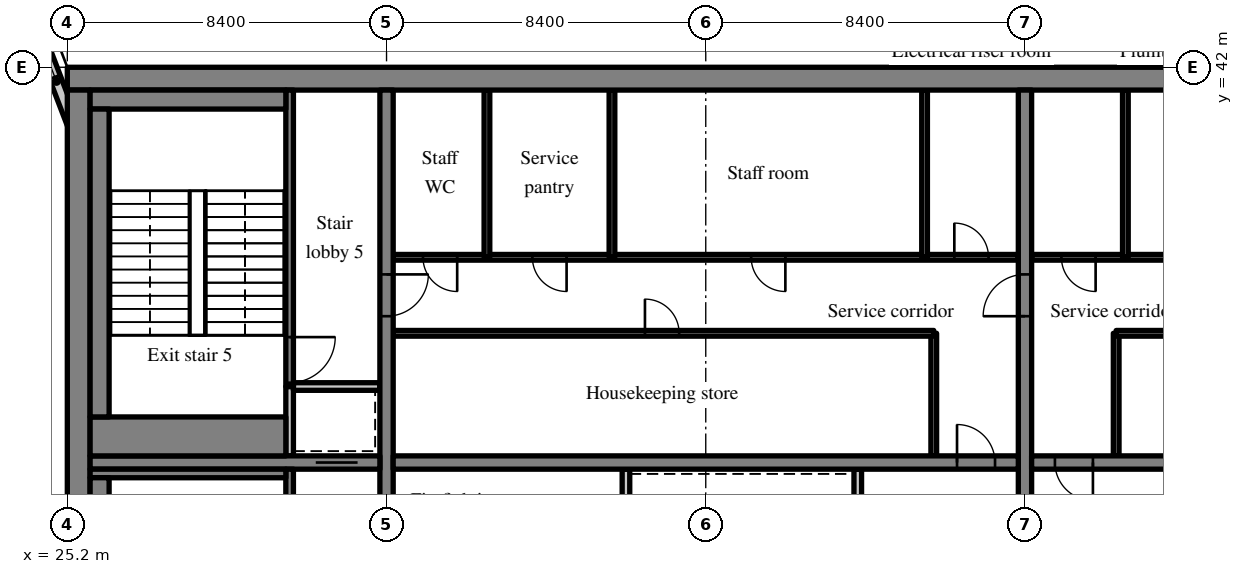
"""IFC4 building model, lengths in metres.
Left out: names, types, materials, properties, quantities, classifications, styles, units other than length and angle.
Written with IfcOpenShell. Run it as: python <this file> out.ifc"""

import sys

from ifc_helpers import new_model, si_unit, direction, frame, frame_2d, origin, place, context, subcontext, project, spatial, rectangle, extrude, source, transform, mapped, element, fill, save


model = new_model("IFC4")
c1 = context("Model", 3, precision=1e-05, world=origin(), true_north=direction((0.0, 1.0)))
c2 = subcontext(c1, "Body", "Model", "MODEL_VIEW")
j1 = project(units=[si_unit("LENGTHUNIT", "METRE"), si_unit("PLANEANGLEUNIT", "RADIAN")], contexts=[c1])
p1 = place(None, origin())
s1 = spatial("IfcSite", under=j1, at=p1, CompositionType="ELEMENT")
p2 = place(p1, origin())
s2 = spatial("IfcBuilding", under=s1, at=p2, CompositionType="ELEMENT")
p3 = place(p2, frame((0.0, 0.0, 253.0)))
s3 = spatial("IfcBuildingStorey", under=s2, at=p3, CompositionType="ELEMENT", Elevation=253.0)
m1 = source(origin(), c2, "Body", "SweptSolid", [
    extrude(rectangle(XDim=50.4, YDim=0.6, at=frame_2d((25.2, 0.0))), origin(), (0.0, 0.0, 1.0), 3.62),
])
p4 = place(p3, frame((25.2, 41.7, 0.0), z_axis=(0.0, 0.0, 1.0), x_axis=(1.0, 0.0, 0.0)))
e1 = element("IfcWall", 1, at=p4, inside=s3, PredefinedType="SHEAR", context=c2, shape_type="MappedRepresentation", body=[
    mapped(m1, transform((0.0, 0.0, 0.0), scale=1.0)),
])
m2 = source(origin(), c2, "Body", "SweptSolid", [
    extrude(rectangle(XDim=18.8, YDim=0.6, at=frame_2d((9.4, 0.0))), origin(), (0.0, 0.0, 1.0), 3.62),
])
p5 = place(p3, frame((25.5, 22.6, 0.0), z_axis=(0.0, 0.0, 1.0), x_axis=(0.0, 1.0, 0.0)))
e2 = element("IfcWall", 2, at=p5, inside=s3, PredefinedType="SHEAR", context=c2, shape_type="MappedRepresentation", body=[
    mapped(m2, transform((0.0, 0.0, 0.0), scale=1.0)),
])
m3 = source(origin(), c2, "Body", "SweptSolid", [
    extrude(rectangle(XDim=18.8, YDim=0.35, at=frame_2d((9.4, 0.0))), origin(), (0.0, 0.0, 1.0), 3.62),
])
p6 = place(p3, frame((33.6, 22.6, 0.0), z_axis=(0.0, 0.0, 1.0), x_axis=(0.0, 1.0, 0.0)))
e3 = element("IfcWall", 3, at=p6, inside=s3, PredefinedType="SHEAR", context=c2, shape_type="MappedRepresentation", body=[
    mapped(m3, transform((0.0, 0.0, 0.0), scale=1.0)),
])
m4 = source(origin(), c2, "Body", "SweptSolid", [
    extrude(rectangle(XDim=1.1, YDim=2.1, at=frame_2d((0.55, 1.05))), frame((0.0, 0.185, 0.0), z_axis=(0.0, -1.0, 0.0), x_axis=(1.0, 0.0, 0.0)), (0.0, 0.0, 1.0), 0.37),
])
p7 = place(p6, frame((12.85, 0.0, 0.0)))
e4 = element("IfcOpeningElement", 4, at=p7, cuts=e3, PredefinedType="OPENING", context=c2, shape_type="MappedRepresentation", body=[
    mapped(m4, transform((0.0, 0.0, 0.0), scale=1.0)),
])
p8 = place(p3, frame((50.4, 22.6, 0.0), z_axis=(0.0, 0.0, 1.0), x_axis=(0.0, 1.0, 0.0)))
e5 = element("IfcWall", 5, at=p8, inside=s3, PredefinedType="SHEAR", context=c2, shape_type="MappedRepresentation", body=[
    mapped(m3, transform((0.0, 0.0, 0.0), scale=1.0)),
])
p9 = place(p8, frame((12.85, 0.0, 0.0)))
e6 = element("IfcOpeningElement", 6, at=p9, cuts=e5, PredefinedType="OPENING", context=c2, shape_type="MappedRepresentation", body=[
    mapped(m4, transform((0.0, 0.0, 0.0), scale=1.0)),
])
m5 = source(origin(), c2, "Body", "SweptSolid", [
    extrude(rectangle(XDim=7.625, YDim=0.35, at=frame_2d((3.812, 0.0))), origin(), (0.0, 0.0, 1.0), 3.62),
])
p10 = place(p3, frame((25.8, 31.6, 0.0), z_axis=(0.0, 0.0, 1.0), x_axis=(1.0, 0.0, 0.0)))
e7 = element("IfcWall", 7, at=p10, inside=s3, PredefinedType="SHEAR", context=c2, shape_type="MappedRepresentation", body=[
    mapped(m5, transform((0.0, 0.0, 0.0), scale=1.0)),
])
p11 = place(p10, frame((5.938, 0.0, 0.0)))
e8 = element("IfcOpeningElement", 8, at=p11, cuts=e7, PredefinedType="OPENING", context=c2, shape_type="MappedRepresentation", body=[
    mapped(m4, transform((0.0, 0.0, 0.0), scale=1.0)),
])
m6 = source(origin(), c2, "Body", "SweptSolid", [
    extrude(rectangle(XDim=16.45, YDim=0.35, at=frame_2d((8.225, 0.0))), origin(), (0.0, 0.0, 1.0), 3.62),
])
p12 = place(p3, frame((33.775, 31.6, 0.0), z_axis=(0.0, 0.0, 1.0), x_axis=(1.0, 0.0, 0.0)))
e9 = element("IfcWall", 9, at=p12, inside=s3, PredefinedType="SHEAR", context=c2, shape_type="MappedRepresentation", body=[
    mapped(m6, transform((0.0, 0.0, 0.0), scale=1.0)),
])
m7 = source(origin(), c2, "Body", "SweptSolid", [
    extrude(rectangle(XDim=1.0, YDim=2.1, at=frame_2d((0.5, 1.05))), frame((0.0, 0.185, 0.0), z_axis=(0.0, -1.0, 0.0), x_axis=(1.0, 0.0, 0.0)), (0.0, 0.0, 1.0), 0.37),
])
p13 = place(p12, frame((14.837, 0.0, 0.0)))
e10 = element("IfcOpeningElement", 10, at=p13, cuts=e9, PredefinedType="OPENING", context=c2, shape_type="MappedRepresentation", body=[
    mapped(m7, transform((0.0, 0.0, 0.0), scale=1.0)),
])
m8 = source(origin(), c2, "Body", "SweptSolid", [
    extrude(rectangle(XDim=16.45, YDim=0.35, at=frame_2d((8.225, 0.0))), origin(), (0.0, 0.0, 1.0), 3.62),
])
p14 = place(p3, frame((50.575, 31.6, 0.0), z_axis=(0.0, 0.0, 1.0), x_axis=(1.0, 0.0, 0.0)))
e11 = element("IfcWall", 11, at=p14, inside=s3, PredefinedType="SHEAR", context=c2, shape_type="MappedRepresentation", body=[
    mapped(m8, transform((0.0, 0.0, 0.0), scale=1.0)),
])
p15 = place(p14, frame((0.613, 0.0, 0.0)))
e12 = element("IfcOpeningElement", 12, at=p15, cuts=e11, PredefinedType="OPENING", context=c2, shape_type="MappedRepresentation", body=[
    mapped(m7, transform((0.0, 0.0, 0.0), scale=1.0)),
])
m9 = source(origin(), c2, "Body", "SweptSolid", [
    extrude(rectangle(XDim=3.559, YDim=0.3, at=frame_2d((1.78, 0.0))), origin(), (0.0, 0.0, 1.0), 3.62),
])
p16 = place(p3, frame((25.55, 39.969, 0.0), z_axis=(0.0, 0.0, 1.0), x_axis=(-0.35779745313, 0.933799219604, 0.0)))
e13 = element("IfcWall", 13, at=p16, inside=s3, PredefinedType="SOLIDWALL", context=c2, shape_type="MappedRepresentation", body=[
    mapped(m9, transform((0.0, 0.0, 0.0), scale=1.0)),
])
m10 = source(origin(), c2, "Body", "SweptSolid", [
    extrude(rectangle(XDim=1.5, YDim=2.0, at=frame_2d((0.75, 1.0))), frame((0.0, 0.16, 0.0), z_axis=(0.0, -1.0, 0.0), x_axis=(1.0, 0.0, 0.0)), (0.0, 0.0, 1.0), 0.32),
])
p17 = place(p16, frame((1.903, 0.0, 0.9)))
e14 = element("IfcOpeningElement", 14, at=p17, cuts=e13, PredefinedType="OPENING", context=c2, shape_type="MappedRepresentation", body=[
    mapped(m10, transform((0.0, 0.0, 0.0), scale=1.0)),
])
m11 = source(origin(), c2, "Body", "SweptSolid", [
    extrude(rectangle(XDim=8.825, YDim=0.2, at=frame_2d((4.413, 0.0))), origin(), (0.0, 0.0, 1.0), 3.62),
])
p18 = place(p3, frame((39.9, 22.6, 0.0), z_axis=(0.0, 0.0, 1.0), x_axis=(0.0, 1.0, 0.0)))
e15 = element("IfcWall", 15, at=p18, inside=s3, PredefinedType="PARTITIONING", context=c2, shape_type="MappedRepresentation", body=[
    mapped(m11, transform((0.0, 0.0, 0.0), scale=1.0)),
])
m12 = source(origin(), c2, "Body", "SweptSolid", [
    extrude(rectangle(XDim=0.9, YDim=2.1, at=frame_2d((0.45, 1.05))), frame((0.0, 0.11, 0.0), z_axis=(0.0, -1.0, 0.0), x_axis=(1.0, 0.0, 0.0)), (0.0, 0.0, 1.0), 0.22),
])
p19 = place(p18, frame((3.95, 0.0, 0.0)))
e16 = element("IfcOpeningElement", 16, at=p19, cuts=e15, PredefinedType="OPENING", context=c2, shape_type="MappedRepresentation", body=[
    mapped(m12, transform((0.0, 0.0, 0.0), scale=1.0)),
])
m13 = source(origin(), c2, "Body", "SweptSolid", [
    extrude(rectangle(XDim=2.625, YDim=0.2, at=frame_2d((1.312, 0.0))), origin(), (0.0, 0.0, 1.0), 3.62),
])
p20 = place(p3, frame((46.0, 28.8, 0.0), z_axis=(0.0, 0.0, 1.0), x_axis=(0.0, 1.0, 0.0)))
e17 = element("IfcWall", 17, at=p20, inside=s3, PredefinedType="SOLIDWALL", context=c2, shape_type="MappedRepresentation", body=[
    mapped(m13, transform((0.0, 0.0, 0.0), scale=1.0)),
])
m14 = source(origin(), c2, "Body", "SweptSolid", [
    extrude(rectangle(XDim=3.225, YDim=0.15, at=frame_2d((1.613, 0.0))), origin(), (0.0, 0.0, 1.0), 3.62),
])
p21 = place(p3, frame((48.0, 31.775, 0.0), z_axis=(0.0, 0.0, 1.0), x_axis=(0.0, 1.0, 0.0)))
e18 = element("IfcWall", 18, at=p21, inside=s3, PredefinedType="PARTITIONING", context=c2, shape_type="MappedRepresentation", body=[
    mapped(m14, transform((0.0, 0.0, 0.0), scale=1.0)),
])
m15 = source(origin(), c2, "Body", "SweptSolid", [
    extrude(rectangle(XDim=14.225, YDim=0.15, at=frame_2d((7.113, 0.0))), origin(), (0.0, 0.0, 1.0), 3.62),
])
p22 = place(p3, frame((33.775, 35.0, 0.0), z_axis=(0.0, 0.0, 1.0), x_axis=(1.0, 0.0, 0.0)))
e19 = element("IfcWall", 19, at=p22, inside=s3, PredefinedType="PARTITIONING", context=c2, shape_type="MappedRepresentation", body=[
    mapped(m15, transform((0.0, 0.0, 0.0), scale=1.0)),
])
m16 = source(origin(), c2, "Body", "SweptSolid", [
    extrude(rectangle(XDim=0.9, YDim=2.1, at=frame_2d((0.45, 1.05))), frame((0.0, 0.085, 0.0), z_axis=(0.0, -1.0, 0.0), x_axis=(1.0, 0.0, 0.0)), (0.0, 0.0, 1.0), 0.17),
])
p23 = place(p22, frame((6.625, 0.0, 0.0)))
e20 = element("IfcOpeningElement", 20, at=p23, cuts=e19, PredefinedType="OPENING", context=c2, shape_type="MappedRepresentation", body=[
    mapped(m16, transform((0.0, 0.0, 0.0), scale=1.0)),
])
m17 = source(origin(), c2, "Body", "SweptSolid", [
    extrude(rectangle(XDim=16.45, YDim=0.15, at=frame_2d((8.225, 0.0))), origin(), (0.0, 0.0, 1.0), 3.62),
])
p24 = place(p3, frame((33.775, 37.0, 0.0), z_axis=(0.0, 0.0, 1.0), x_axis=(1.0, 0.0, 0.0)))
e21 = element("IfcWall", 21, at=p24, inside=s3, PredefinedType="PARTITIONING", context=c2, shape_type="MappedRepresentation", body=[
    mapped(m17, transform((0.0, 0.0, 0.0), scale=1.0)),
])
p25 = place(p24, frame((0.784, 0.0, 0.0)))
e22 = element("IfcOpeningElement", 22, at=p25, cuts=e21, PredefinedType="OPENING", context=c2, shape_type="MappedRepresentation", body=[
    mapped(m16, transform((0.0, 0.0, 0.0), scale=1.0)),
])
p26 = place(p24, frame((3.663, 0.0, 0.0)))
e23 = element("IfcOpeningElement", 23, at=p26, cuts=e21, PredefinedType="OPENING", context=c2, shape_type="MappedRepresentation", body=[
    mapped(m16, transform((0.0, 0.0, 0.0), scale=1.0)),
])
p27 = place(p24, frame((9.42, 0.0, 0.0)))
e24 = element("IfcOpeningElement", 24, at=p27, cuts=e21, PredefinedType="OPENING", context=c2, shape_type="MappedRepresentation", body=[
    mapped(m16, transform((0.0, 0.0, 0.0), scale=1.0)),
])
p28 = place(p24, frame((14.766, 0.0, 0.0)))
e25 = element("IfcOpeningElement", 25, at=p28, cuts=e21, PredefinedType="OPENING", context=c2, shape_type="MappedRepresentation", body=[
    mapped(m16, transform((0.0, 0.0, 0.0), scale=1.0)),
])
m18 = source(origin(), c2, "Body", "SweptSolid", [
    extrude(rectangle(XDim=4.4, YDim=0.15, at=frame_2d((2.2, 0.0))), origin(), (0.0, 0.0, 1.0), 3.62),
])
for number, where, z_axis, x_axis in (
    (26, (36.242, 37.0, 0.0), (0.0, 0.0, 1.0), (0.0, 1.0, 0.0)),
    (27, (39.532, 37.0, 0.0), (0.0, 0.0, 1.0), (0.0, 1.0, 0.0)),
    (28, (47.758, 37.0, 0.0), (0.0, 0.0, 1.0), (0.0, 1.0, 0.0)),
):
    element("IfcWall", number, at=place(p3, frame(where, z_axis=z_axis, x_axis=x_axis)), inside=s3, PredefinedType="PARTITIONING", context=c2, shape_type="MappedRepresentation", body=[
        mapped(m18, transform((0.0, 0.0, 0.0), scale=1.0)),
    ])
p29 = place(p3, frame((52.8, 31.775, 0.0), z_axis=(0.0, 0.0, 1.0), x_axis=(0.0, 1.0, 0.0)))
e29 = element("IfcWall", 29, at=p29, inside=s3, PredefinedType="PARTITIONING", context=c2, shape_type="MappedRepresentation", body=[
    mapped(m14, transform((0.0, 0.0, 0.0), scale=1.0)),
])
m19 = source(origin(), c2, "Body", "SweptSolid", [
    extrude(rectangle(XDim=14.225, YDim=0.15, at=frame_2d((7.112, 0.0))), origin(), (0.0, 0.0, 1.0), 3.62),
])
p30 = place(p3, frame((67.025, 35.0, 0.0), z_axis=(0.0, 0.0, 1.0), x_axis=(-1.0, 0.0, 0.0)))
e30 = element("IfcWall", 30, at=p30, inside=s3, PredefinedType="PARTITIONING", context=c2, shape_type="MappedRepresentation", body=[
    mapped(m19, transform((0.0, 0.0, 0.0), scale=1.0)),
])
p31 = place(p30, frame((3.441, 0.0, 0.0)))
e31 = element("IfcOpeningElement", 31, at=p31, cuts=e30, PredefinedType="OPENING", context=c2, shape_type="MappedRepresentation", body=[
    mapped(m16, transform((0.0, 0.0, 0.0), scale=1.0)),
])
p32 = place(p30, frame((10.516, 0.0, 0.0)))
e32 = element("IfcOpeningElement", 32, at=p32, cuts=e30, PredefinedType="OPENING", context=c2, shape_type="MappedRepresentation", body=[
    mapped(m16, transform((0.0, 0.0, 0.0), scale=1.0)),
])
m20 = source(origin(), c2, "Body", "SweptSolid", [
    extrude(rectangle(XDim=16.45, YDim=0.15, at=frame_2d((8.225, 0.0))), origin(), (0.0, 0.0, 1.0), 3.62),
])
p33 = place(p3, frame((67.025, 37.0, 0.0), z_axis=(0.0, 0.0, 1.0), x_axis=(-1.0, 0.0, 0.0)))
e33 = element("IfcWall", 33, at=p33, inside=s3, PredefinedType="PARTITIONING", context=c2, shape_type="MappedRepresentation", body=[
    mapped(m20, transform((0.0, 0.0, 0.0), scale=1.0)),
])
p34 = place(p33, frame((6.541, 0.0, 0.0)))
e34 = element("IfcOpeningElement", 34, at=p34, cuts=e33, PredefinedType="OPENING", context=c2, shape_type="MappedRepresentation", body=[
    mapped(m16, transform((0.0, 0.0, 0.0), scale=1.0)),
])
p35 = place(p33, frame((14.766, 0.0, 0.0)))
e35 = element("IfcOpeningElement", 35, at=p35, cuts=e33, PredefinedType="OPENING", context=c2, shape_type="MappedRepresentation", body=[
    mapped(m16, transform((0.0, 0.0, 0.0), scale=1.0)),
])
p36 = place(p3, frame((53.042, 37.0, 0.0), z_axis=(0.0, 0.0, 1.0), x_axis=(0.0, 1.0, 0.0)))
e36 = element("IfcWall", 36, at=p36, inside=s3, PredefinedType="PARTITIONING", context=c2, shape_type="MappedRepresentation", body=[
    mapped(m18, transform((0.0, 0.0, 0.0), scale=1.0)),
])
m21 = source(origin(), c2, "Body", "SweptSolid", [
    extrude(rectangle(XDim=8.825, YDim=0.2, at=frame_2d((4.413, 0.0))), origin(), (0.0, 0.0, 1.0), 3.62),
])
p37 = place(p3, frame((31.05, 22.6, 0.0), z_axis=(0.0, 0.0, 1.0), x_axis=(0.0, 1.0, 0.0)))
e37 = element("IfcWall", 37, at=p37, inside=s3, PredefinedType="SOLIDWALL", context=c2, shape_type="MappedRepresentation", body=[
    mapped(m21, transform((0.0, 0.0, 0.0), scale=1.0)),
])
m22 = source(origin(), c2, "Body", "SweptSolid", [
    extrude(rectangle(XDim=1.2, YDim=2.1, at=frame_2d((0.6, 1.05))), frame((0.0, 0.11, 0.0), z_axis=(0.0, -1.0, 0.0), x_axis=(1.0, 0.0, 0.0)), (0.0, 0.0, 1.0), 0.22),
])
p38 = place(p37, frame((1.0, 0.0, 0.0)))
e38 = element("IfcOpeningElement", 38, at=p38, cuts=e37, PredefinedType="OPENING", context=c2, shape_type="MappedRepresentation", body=[
    mapped(m22, transform((0.0, 0.0, 0.0), scale=1.0)),
])
m23 = source(origin(), c2, "Body", "SweptSolid", [
    extrude(rectangle(XDim=1.825, YDim=0.2, at=frame_2d((0.913, 0.0))), origin(), (0.0, 0.0, 1.0), 3.62),
])
p39 = place(p3, frame((31.05, 31.775, 0.0), z_axis=(0.0, 0.0, 1.0), x_axis=(0.0, 1.0, 0.0)))
e39 = element("IfcWall", 39, at=p39, inside=s3, PredefinedType="SOLIDWALL", context=c2, shape_type="MappedRepresentation", body=[
    mapped(m23, transform((0.0, 0.0, 0.0), scale=1.0)),
])
m24 = source(origin(), c2, "Body", "SweptSolid", [
    extrude(rectangle(XDim=2.275, YDim=0.2, at=frame_2d((1.138, 0.0))), origin(), (0.0, 0.0, 1.0), 3.62),
])
p40 = place(p3, frame((31.15, 33.6, 0.0), z_axis=(0.0, 0.0, 1.0), x_axis=(1.0, 0.0, 0.0)))
e40 = element("IfcWall", 40, at=p40, inside=s3, PredefinedType="SOLIDWALL", context=c2, shape_type="MappedRepresentation", body=[
    mapped(m24, transform((0.0, 0.0, 0.0), scale=1.0)),
])
m25 = source(origin(), c2, "Body", "SweptSolid", [
    extrude(rectangle(XDim=7.8, YDim=0.2, at=frame_2d((3.9, 0.0))), origin(), (0.0, 0.0, 1.0), 3.62),
])
p41 = place(p3, frame((31.05, 33.6, 0.0), z_axis=(0.0, 0.0, 1.0), x_axis=(0.0, 1.0, 0.0)))
e41 = element("IfcWall", 41, at=p41, inside=s3, PredefinedType="SOLIDWALL", context=c2, shape_type="MappedRepresentation", body=[
    mapped(m25, transform((0.0, 0.0, 0.0), scale=1.0)),
])
p42 = place(p41, frame((0.1, 0.0, 0.0)))
e42 = element("IfcOpeningElement", 42, at=p42, cuts=e41, PredefinedType="OPENING", context=c2, shape_type="MappedRepresentation", body=[
    mapped(m22, transform((0.0, 0.0, 0.0), scale=1.0)),
])
m26 = source(origin(), c2, "Body", "SweptSolid", [
    extrude(rectangle(XDim=5.15, YDim=0.225, at=frame_2d((2.575, 0.0))), origin(), (0.0, 0.0, 1.0), 3.62),
])
p43 = place(p3, frame((25.8, 31.312, 0.0), z_axis=(0.0, 0.0, 1.0), x_axis=(1.0, 0.0, 0.0)))
e43 = element("IfcWall", 43, at=p43, inside=s3, PredefinedType="SOLIDWALL", context=c2, shape_type="MappedRepresentation", body=[
    mapped(m26, transform((0.0, 0.0, 0.0), scale=1.0)),
])
m27 = source(origin(), c2, "Body", "SweptSolid", [
    extrude(rectangle(XDim=8.1, YDim=0.5, at=frame_2d((4.05, 0.0))), origin(), (0.0, 0.0, 1.0), 3.62),
])
p44 = place(p3, frame((26.05, 23.1, 0.0), z_axis=(0.0, 0.0, 1.0), x_axis=(0.0, 1.0, 0.0)))
e44 = element("IfcWall", 44, at=p44, inside=s3, PredefinedType="SOLIDWALL", context=c2, shape_type="MappedRepresentation", body=[
    mapped(m27, transform((0.0, 0.0, 0.0), scale=1.0)),
])
m28 = source(origin(), c2, "Body", "SweptSolid", [
    extrude(rectangle(XDim=5.15, YDim=0.5, at=frame_2d((2.575, 0.0))), origin(), (0.0, 0.0, 1.0), 3.62),
])
p45 = place(p3, frame((25.8, 41.15, 0.0), z_axis=(0.0, 0.0, 1.0), x_axis=(1.0, 0.0, 0.0)))
e45 = element("IfcWall", 45, at=p45, inside=s3, PredefinedType="SOLIDWALL", context=c2, shape_type="MappedRepresentation", body=[
    mapped(m28, transform((0.0, 0.0, 0.0), scale=1.0)),
])
m29 = source(origin(), c2, "Body", "SweptSolid", [
    extrude(rectangle(XDim=5.15, YDim=1.025, at=frame_2d((2.575, 0.0))), origin(), (0.0, 0.0, 1.0), 3.62),
])
p46 = place(p3, frame((25.8, 32.287, 0.0), z_axis=(0.0, 0.0, 1.0), x_axis=(1.0, 0.0, 0.0)))
e46 = element("IfcWall", 46, at=p46, inside=s3, PredefinedType="SOLIDWALL", context=c2, shape_type="MappedRepresentation", body=[
    mapped(m29, transform((0.0, 0.0, 0.0), scale=1.0)),
])
p47 = place(p3, frame((26.05, 32.8, 0.0), z_axis=(0.0, 0.0, 1.0), x_axis=(0.0, 1.0, 0.0)))
e47 = element("IfcWall", 47, at=p47, inside=s3, PredefinedType="SOLIDWALL", context=c2, shape_type="MappedRepresentation", body=[
    mapped(m27, transform((0.0, 0.0, 0.0), scale=1.0)),
])
m30 = source(origin(), c2, "Body", "SweptSolid", [
    extrude(rectangle(XDim=1.5, YDim=2.0, at=frame_2d((0.75, 1.0))), frame((0.0, 0.03, 0.0), z_axis=(0.0, -1.0, 0.0), x_axis=(1.0, 0.0, 0.0)), (0.0, 0.0, 1.0), 0.06),
])
p48 = place(p17, origin())
e48 = element("IfcWindow", 48, at=p48, inside=s3, PartitioningType="SINGLE_PANEL", PredefinedType="WINDOW", context=c2, shape_type="MappedRepresentation", body=[
    mapped(m30, transform((0.0, 0.0, 0.0), scale=1.0)),
])
fill(e14, e48)
m31 = source(origin(), c2, "Body", "SweptSolid", [
    extrude(rectangle(XDim=1.0, YDim=2.1, at=frame_2d((0.5, 1.05))), frame((0.0, 0.025, 0.0), z_axis=(0.0, -1.0, 0.0), x_axis=(1.0, 0.0, 0.0)), (0.0, 0.0, 1.0), 0.05),
])
p49 = place(p13, origin())
e49 = element("IfcDoor", 49, at=p49, inside=s3, OperationType="SINGLE_SWING_LEFT", PredefinedType="DOOR", context=c2, shape_type="MappedRepresentation", body=[
    mapped(m31, transform((0.0, 0.0, 0.0), scale=1.0)),
])
fill(e10, e49)
m32 = source(origin(), c2, "Body", "SweptSolid", [
    extrude(rectangle(XDim=0.9, YDim=2.1, at=frame_2d((0.45, 1.05))), frame((0.0, 0.025, 0.0), z_axis=(0.0, -1.0, 0.0), x_axis=(1.0, 0.0, 0.0)), (0.0, 0.0, 1.0), 0.05),
])
p50 = place(p23, origin())
e50 = element("IfcDoor", 50, at=p50, inside=s3, OperationType="SINGLE_SWING_LEFT", PredefinedType="DOOR", context=c2, shape_type="MappedRepresentation", body=[
    mapped(m32, transform((0.0, 0.0, 0.0), scale=1.0)),
])
fill(e20, e50)
p51 = place(p25, origin())
e51 = element("IfcDoor", 51, at=p51, inside=s3, OperationType="SINGLE_SWING_RIGHT", PredefinedType="DOOR", context=c2, shape_type="MappedRepresentation", body=[
    mapped(m32, transform((0.0, 0.0, 0.0), scale=1.0)),
])
fill(e22, e51)
p52 = place(p26, origin())
e52 = element("IfcDoor", 52, at=p52, inside=s3, OperationType="SINGLE_SWING_RIGHT", PredefinedType="DOOR", context=c2, shape_type="MappedRepresentation", body=[
    mapped(m32, transform((0.0, 0.0, 0.0), scale=1.0)),
])
fill(e23, e52)
p53 = place(p27, origin())
e53 = element("IfcDoor", 53, at=p53, inside=s3, OperationType="SINGLE_SWING_RIGHT", PredefinedType="DOOR", context=c2, shape_type="MappedRepresentation", body=[
    mapped(m32, transform((0.0, 0.0, 0.0), scale=1.0)),
])
fill(e24, e53)
p54 = place(p28, origin())
e54 = element("IfcDoor", 54, at=p54, inside=s3, OperationType="SINGLE_SWING_LEFT", PredefinedType="DOOR", context=c2, shape_type="MappedRepresentation", body=[
    mapped(m32, transform((0.0, 0.0, 0.0), scale=1.0)),
])
fill(e25, e54)
p55 = place(p15, origin())
e55 = element("IfcDoor", 55, at=p55, inside=s3, OperationType="SINGLE_SWING_RIGHT", PredefinedType="DOOR", context=c2, shape_type="MappedRepresentation", body=[
    mapped(m31, transform((0.0, 0.0, 0.0), scale=1.0)),
])
fill(e12, e55)
p56 = place(p35, origin())
e56 = element("IfcDoor", 56, at=p56, inside=s3, OperationType="SINGLE_SWING_LEFT", PredefinedType="DOOR", context=c2, shape_type="MappedRepresentation", body=[
    mapped(m32, transform((0.0, 0.0, 0.0), scale=1.0)),
])
fill(e35, e56)
m33 = source(origin(), c2, "Body", "SweptSolid", [
    extrude(rectangle(XDim=1.1, YDim=2.1, at=frame_2d((0.55, 1.05))), frame((0.0, 0.025, 0.0), z_axis=(0.0, -1.0, 0.0), x_axis=(1.0, 0.0, 0.0)), (0.0, 0.0, 1.0), 0.05),
])
p57 = place(p11, origin())
e57 = element("IfcDoor", 57, at=p57, inside=s3, OperationType="SLIDING_TO_RIGHT", PredefinedType="DOOR", context=c2, shape_type="MappedRepresentation", body=[
    mapped(m33, transform((0.0, 0.0, 0.0), scale=1.0)),
])
fill(e8, e57)
m34 = source(origin(), c2, "Body", "SweptSolid", [
    extrude(rectangle(XDim=1.2, YDim=2.1, at=frame_2d((0.6, 1.05))), frame((0.0, 0.025, 0.0), z_axis=(0.0, -1.0, 0.0), x_axis=(1.0, 0.0, 0.0)), (0.0, 0.0, 1.0), 0.05),
])
p58 = place(p42, origin())
e58 = element("IfcDoor", 58, at=p58, inside=s3, OperationType="SINGLE_SWING_RIGHT", PredefinedType="DOOR", context=c2, shape_type="MappedRepresentation", body=[
    mapped(m34, transform((0.0, 0.0, 0.0), scale=1.0)),
])
fill(e42, e58)
p59 = place(p7, origin())
e59 = element("IfcDoor", 59, at=p59, inside=s3, OperationType="SINGLE_SWING_RIGHT", PredefinedType="DOOR", context=c2, shape_type="MappedRepresentation", body=[
    mapped(m33, transform((0.0, 0.0, 0.0), scale=1.0)),
])
fill(e4, e59)
p60 = place(p9, origin())
e60 = element("IfcDoor", 60, at=p60, inside=s3, OperationType="SINGLE_SWING_LEFT", PredefinedType="DOOR", context=c2, shape_type="MappedRepresentation", body=[
    mapped(m33, transform((0.0, 0.0, 0.0), scale=1.0)),
])
fill(e6, e60)
save(model, sys.argv[1])
